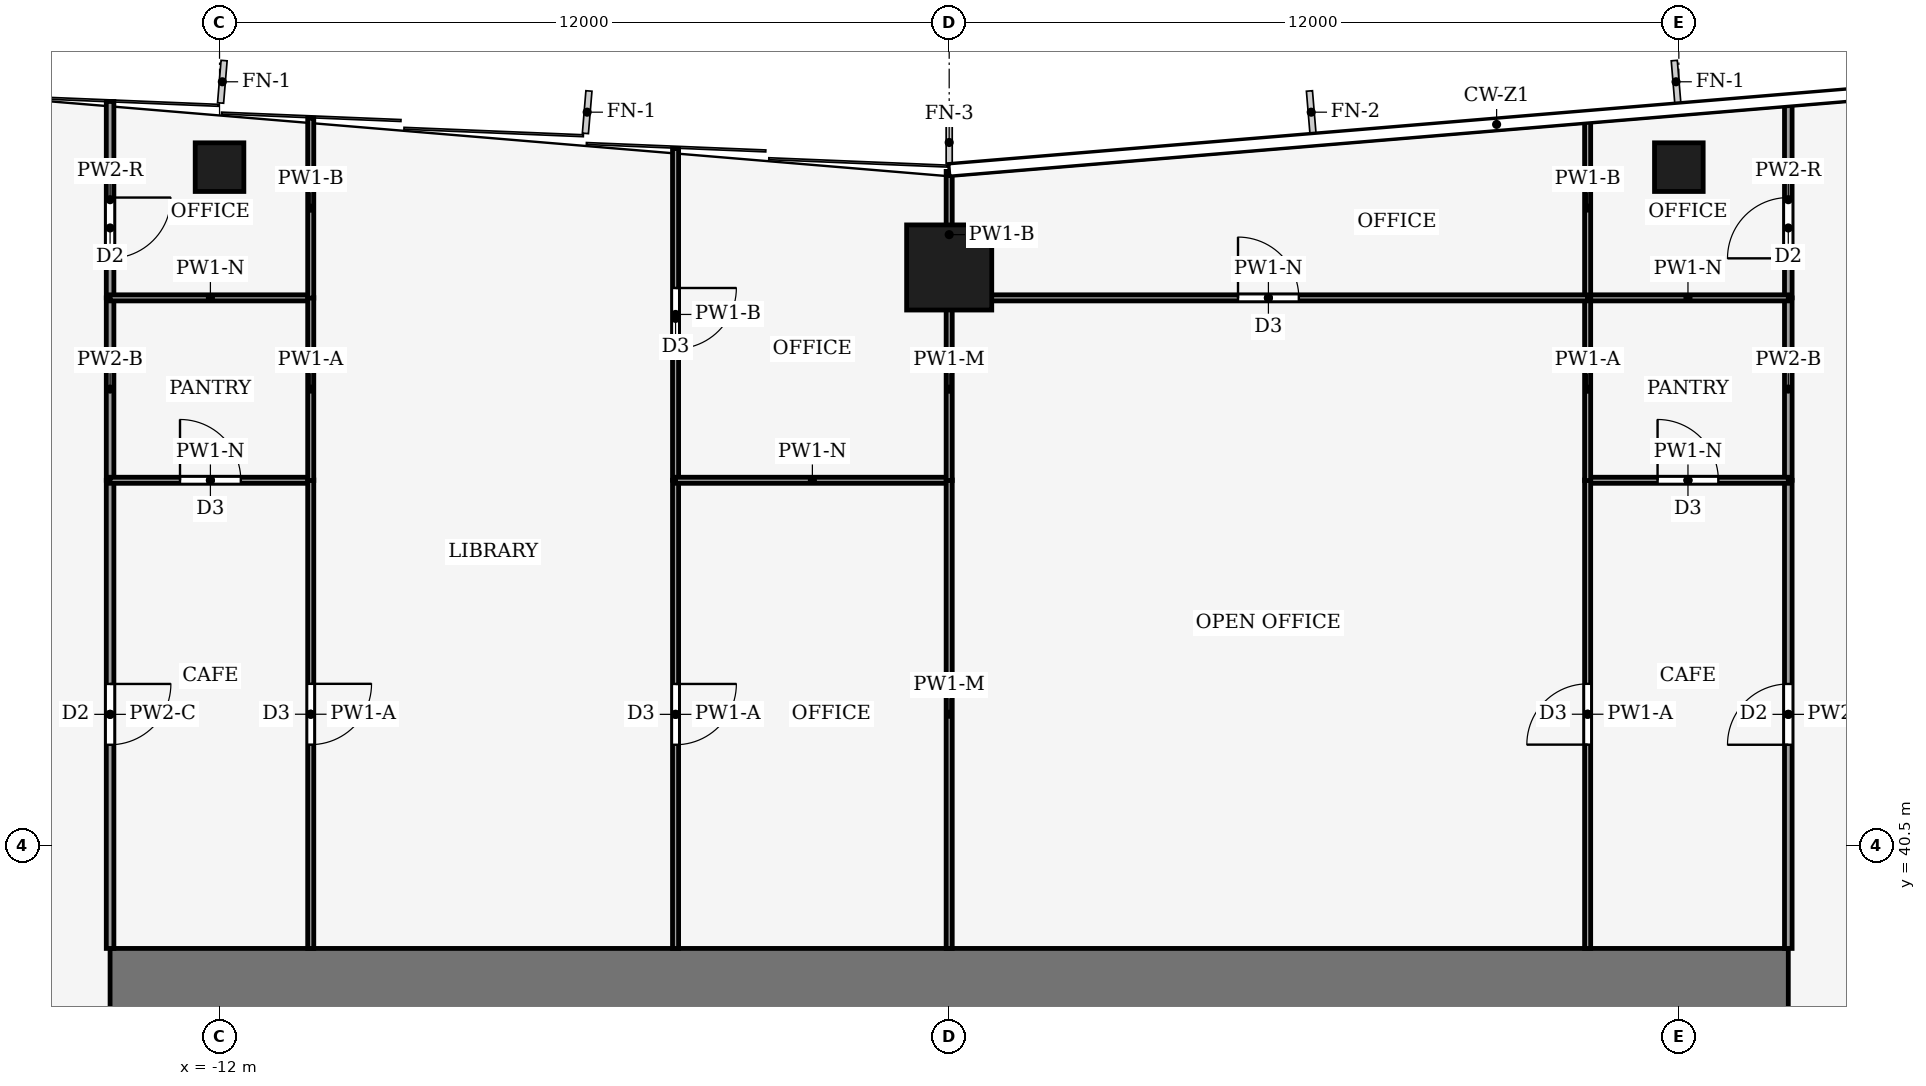
"""IFC4 building model, lengths in metres.
Left out: names, types, materials, properties, quantities, classifications, styles, units other than length and angle.
Written with IfcOpenShell. Run it as: python <this file> out.ifc"""

import sys

from ifc_helpers import new_model, si_unit, direction, frame, frame_2d, origin, origin_2d, place, context, subcontext, project, spatial, rectangle, hollow_rectangle, extrude, element, fill, save


model = new_model("IFC4")
c1 = context("Model", 3, precision=1e-05, world=origin(), true_north=direction((0.0, 1.0)))
c2 = subcontext(c1, "Body", "Model", "MODEL_VIEW")
j1 = project(units=[si_unit("LENGTHUNIT", "METRE"), si_unit("PLANEANGLEUNIT", "RADIAN")], contexts=[c1])
p1 = place(None, origin())
s1 = spatial("IfcSite", under=j1, at=p1, CompositionType="ELEMENT")
p2 = place(p1, origin())
s2 = spatial("IfcBuilding", under=s1, at=p2, CompositionType="ELEMENT")
p3 = place(p2, frame((0.0, 0.0, 65.0)))
s3 = spatial("IfcBuildingStorey", under=s2, at=p3, CompositionType="ELEMENT", Elevation=65.0)
p4 = place(p3, frame((-13.8, 38.2, -0.13), z_axis=(0.0, 0.0, 1.0), x_axis=(1.0, 0.0, 0.0)))
e1 = element("IfcWall", 1, at=p4, inside=s3, PredefinedType="SHEAR", context=c2, shape_type="SweptSolid", body=[
    extrude(rectangle(XDim=27.6, YDim=1.2, at=frame_2d((13.8, 0.0))), origin(), (0.0, 0.0, 1.0), 5.0),
])
p5 = place(p3, frame((0.0, 50.0, 0.0), z_axis=(0.0, 0.0, 1.0), x_axis=(1.0, 0.0, 0.0)))
e2 = element("IfcColumn", 2, at=p5, inside=s3, PredefinedType="COLUMN", context=c2, shape_type="SweptSolid", body=[
    extrude(hollow_rectangle(XDim=1.4, YDim=1.4, WallThickness=0.08, at=origin_2d()), origin(), (0.0, 0.0, 1.0), 5.0),
])
for number, where, z_axis, x_axis in (
    (3, (-12.0, 51.65, 0.0), (0.0, 0.0, 1.0), (1.0, 0.0, 0.0)),
    (4, (12.0, 51.65, 0.0), (0.0, 0.0, 1.0), (1.0, 0.0, 0.0)),
):
    element("IfcColumn", number, at=place(p3, frame(where, z_axis=z_axis, x_axis=x_axis)), inside=s3, PredefinedType="COLUMN", context=c2, shape_type="SweptSolid", body=[
        extrude(hollow_rectangle(XDim=0.8, YDim=0.8, WallThickness=0.04, at=origin_2d()), origin(), (0.0, 0.0, 1.0), 5.0),
    ])
p6 = place(p3, frame((-13.8, 46.5, 0.0), z_axis=(0.0, 0.0, 1.0), x_axis=(0.0, -1.0, 0.0)))
e5 = element("IfcWall", 5, at=p6, inside=s3, PredefinedType="PARTITIONING", context=c2, shape_type="SweptSolid", body=[
    extrude(rectangle(XDim=7.7, YDim=0.125, at=frame_2d((3.85, 0.0))), origin(), (0.0, 0.0, 1.0), 4.14),
])
p7 = place(p6, frame((3.35, 0.0, 0.0)))
e6 = element("IfcOpeningElement", 6, at=p7, cuts=e5, PredefinedType="OPENING", context=c2, shape_type="SweptSolid", body=[
    extrude(rectangle(XDim=1.0, YDim=2.1, at=frame_2d((0.5, 1.05))), frame((0.0, 0.073, 0.0), z_axis=(0.0, -1.0, 0.0), x_axis=(1.0, 0.0, 0.0)), (0.0, 0.0, 1.0), 0.145),
])
p8 = place(p3, frame((-13.8, 46.5, 0.0), z_axis=(0.0, 0.0, 1.0), x_axis=(0.0, 1.0, 0.0)))
e7 = element("IfcWall", 7, at=p8, inside=s3, PredefinedType="PARTITIONING", context=c2, shape_type="SweptSolid", body=[
    extrude(rectangle(XDim=3.0, YDim=0.125, at=frame_2d((1.5, 0.0))), origin(), (0.0, 0.0, 1.0), 4.87),
])
p9 = place(p3, frame((-13.8, 52.73, 0.0), z_axis=(0.0, 0.0, 1.0), x_axis=(0.0, -1.0, 0.0)))
e8 = element("IfcWall", 8, at=p9, inside=s3, PredefinedType="PARTITIONING", context=c2, shape_type="SweptSolid", body=[
    extrude(rectangle(XDim=3.23, YDim=0.125, at=frame_2d((1.615, 0.0))), origin(), (0.0, 0.0, 1.0), 4.04),
])
p10 = place(p9, frame((1.58, 0.0, 0.0)))
e9 = element("IfcOpeningElement", 9, at=p10, cuts=e8, PredefinedType="OPENING", context=c2, shape_type="SweptSolid", body=[
    extrude(rectangle(XDim=1.0, YDim=2.1, at=frame_2d((0.5, 1.05))), frame((0.0, 0.073, 0.0), z_axis=(0.0, -1.0, 0.0), x_axis=(1.0, 0.0, 0.0)), (0.0, 0.0, 1.0), 0.145),
])
p11 = place(p3, frame((13.8, 38.8, 0.0), z_axis=(0.0, 0.0, 1.0), x_axis=(0.0, 1.0, 0.0)))
e10 = element("IfcWall", 10, at=p11, inside=s3, PredefinedType="PARTITIONING", context=c2, shape_type="SweptSolid", body=[
    extrude(rectangle(XDim=7.7, YDim=0.125, at=frame_2d((3.85, 0.0))), origin(), (0.0, 0.0, 1.0), 4.14),
])
p12 = place(p11, frame((3.35, 0.0, 0.0)))
e11 = element("IfcOpeningElement", 11, at=p12, cuts=e10, PredefinedType="OPENING", context=c2, shape_type="SweptSolid", body=[
    extrude(rectangle(XDim=1.0, YDim=2.1, at=frame_2d((0.5, 1.05))), frame((0.0, 0.073, 0.0), z_axis=(0.0, -1.0, 0.0), x_axis=(1.0, 0.0, 0.0)), (0.0, 0.0, 1.0), 0.145),
])
p13 = place(p3, frame((13.8, 49.5, 0.0), z_axis=(0.0, 0.0, 1.0), x_axis=(0.0, -1.0, 0.0)))
e12 = element("IfcWall", 12, at=p13, inside=s3, PredefinedType="PARTITIONING", context=c2, shape_type="SweptSolid", body=[
    extrude(rectangle(XDim=3.0, YDim=0.125, at=frame_2d((1.5, 0.0))), origin(), (0.0, 0.0, 1.0), 4.87),
])
p14 = place(p3, frame((13.8, 49.5, 0.0), z_axis=(0.0, 0.0, 1.0), x_axis=(0.0, 1.0, 0.0)))
e13 = element("IfcWall", 13, at=p14, inside=s3, PredefinedType="PARTITIONING", context=c2, shape_type="SweptSolid", body=[
    extrude(rectangle(XDim=3.23, YDim=0.125, at=frame_2d((1.615, 0.0))), origin(), (0.0, 0.0, 1.0), 4.04),
])
p15 = place(p14, frame((0.65, 0.0, 0.0)))
e14 = element("IfcOpeningElement", 14, at=p15, cuts=e13, PredefinedType="OPENING", context=c2, shape_type="SweptSolid", body=[
    extrude(rectangle(XDim=1.0, YDim=2.1, at=frame_2d((0.5, 1.05))), frame((0.0, 0.073, 0.0), z_axis=(0.0, -1.0, 0.0), x_axis=(1.0, 0.0, 0.0)), (0.0, 0.0, 1.0), 0.145),
])
p16 = place(p3, frame((-13.8, 46.5, 0.0), z_axis=(0.0, 0.0, 1.0), x_axis=(1.0, 0.0, 0.0)))
e15 = element("IfcWall", 15, at=p16, inside=s3, PredefinedType="PARTITIONING", context=c2, shape_type="SweptSolid", body=[
    extrude(rectangle(XDim=3.3, YDim=0.1, at=frame_2d((1.65, 0.0))), origin(), (0.0, 0.0, 1.0), 4.39),
])
p17 = place(p16, frame((1.15, 0.0, 0.0)))
e16 = element("IfcOpeningElement", 16, at=p17, cuts=e15, PredefinedType="OPENING", context=c2, shape_type="SweptSolid", body=[
    extrude(rectangle(XDim=1.0, YDim=2.1, at=frame_2d((0.5, 1.05))), frame((0.0, 0.06, 0.0), z_axis=(0.0, -1.0, 0.0), x_axis=(1.0, 0.0, 0.0)), (0.0, 0.0, 1.0), 0.12),
])
p18 = place(p3, frame((-10.5, 46.504, 0.0), z_axis=(0.0, 0.0, 1.0), x_axis=(0.0, -1.0, 0.0)))
e17 = element("IfcWall", 17, at=p18, inside=s3, PredefinedType="PARTITIONING", context=c2, shape_type="SweptSolid", body=[
    extrude(rectangle(XDim=7.704, YDim=0.1, at=frame_2d((3.852, 0.0))), origin(), (0.0, 0.0, 1.0), 4.87),
])
p19 = place(p18, frame((3.352, 0.0, 0.0)))
e18 = element("IfcOpeningElement", 18, at=p19, cuts=e17, PredefinedType="OPENING", context=c2, shape_type="SweptSolid", body=[
    extrude(rectangle(XDim=1.0, YDim=2.1, at=frame_2d((0.5, 1.05))), frame((0.0, 0.06, 0.0), z_axis=(0.0, -1.0, 0.0), x_axis=(1.0, 0.0, 0.0)), (0.0, 0.0, 1.0), 0.12),
])
p20 = place(p3, frame((-10.5, 49.5, 0.0), z_axis=(0.0, 0.0, 1.0), x_axis=(-1.0, 0.0, 0.0)))
e19 = element("IfcWall", 19, at=p20, inside=s3, PredefinedType="PARTITIONING", context=c2, shape_type="SweptSolid", body=[
    extrude(rectangle(XDim=3.3, YDim=0.1, at=frame_2d((1.65, 0.0))), origin(), (0.0, 0.0, 1.0), 4.39),
])
p21 = place(p3, frame((-10.5, 46.496, 0.0), z_axis=(0.0, 0.0, 1.0), x_axis=(0.0, 1.0, 0.0)))
e20 = element("IfcWall", 20, at=p21, inside=s3, PredefinedType="PARTITIONING", context=c2, shape_type="SweptSolid", body=[
    extrude(rectangle(XDim=3.008, YDim=0.1, at=frame_2d((1.504, 0.0))), origin(), (0.0, 0.0, 1.0), 4.87),
])
p22 = place(p3, frame((-10.5, 49.496, 0.0), z_axis=(0.0, 0.0, 1.0), x_axis=(0.0, 1.0, 0.0)))
e21 = element("IfcWall", 21, at=p22, inside=s3, PredefinedType="PARTITIONING", context=c2, shape_type="SweptSolid", body=[
    extrude(rectangle(XDim=2.959, YDim=0.1, at=frame_2d((1.479, 0.0))), origin(), (0.0, 0.0, 1.0), 4.04),
])
p23 = place(p3, frame((-4.5, 46.5, 0.0), z_axis=(0.0, 0.0, 1.0), x_axis=(0.0, -1.0, 0.0)))
e22 = element("IfcWall", 22, at=p23, inside=s3, PredefinedType="PARTITIONING", context=c2, shape_type="SweptSolid", body=[
    extrude(rectangle(XDim=7.7, YDim=0.1, at=frame_2d((3.85, 0.0))), origin(), (0.0, 0.0, 1.0), 4.87),
])
p24 = place(p23, frame((3.35, 0.0, 0.0)))
e23 = element("IfcOpeningElement", 23, at=p24, cuts=e22, PredefinedType="OPENING", context=c2, shape_type="SweptSolid", body=[
    extrude(rectangle(XDim=1.0, YDim=2.1, at=frame_2d((0.5, 1.05))), frame((0.0, 0.06, 0.0), z_axis=(0.0, -1.0, 0.0), x_axis=(1.0, 0.0, 0.0)), (0.0, 0.0, 1.0), 0.12),
])
p25 = place(p3, frame((-4.5, 51.955, 0.0), z_axis=(0.0, 0.0, 1.0), x_axis=(0.0, -1.0, 0.0)))
e24 = element("IfcWall", 24, at=p25, inside=s3, PredefinedType="PARTITIONING", context=c2, shape_type="SweptSolid", body=[
    extrude(rectangle(XDim=5.455, YDim=0.1, at=frame_2d((2.728, 0.0))), origin(), (0.0, 0.0, 1.0), 4.04),
])
p26 = place(p25, frame((2.292, 0.0, 0.0)))
e25 = element("IfcOpeningElement", 25, at=p26, cuts=e24, PredefinedType="OPENING", context=c2, shape_type="SweptSolid", body=[
    extrude(rectangle(XDim=1.0, YDim=2.1, at=frame_2d((0.5, 1.05))), frame((0.0, 0.06, 0.0), z_axis=(0.0, -1.0, 0.0), x_axis=(1.0, 0.0, 0.0)), (0.0, 0.0, 1.0), 0.12),
])
p27 = place(p3, frame((0.0, 46.5, 0.0), z_axis=(0.0, 0.0, 1.0), x_axis=(-1.0, 0.0, 0.0)))
e26 = element("IfcWall", 26, at=p27, inside=s3, PredefinedType="PARTITIONING", context=c2, shape_type="SweptSolid", body=[
    extrude(rectangle(XDim=4.5, YDim=0.1, at=frame_2d((2.25, 0.0))), origin(), (0.0, 0.0, 1.0), 4.39),
])
p28 = place(p3, frame((0.0, 38.8, 0.0), z_axis=(0.0, 0.0, 1.0), x_axis=(0.0, 1.0, 0.0)))
e27 = element("IfcWall", 27, at=p28, inside=s3, PredefinedType="PARTITIONING", context=c2, shape_type="SweptSolid", body=[
    extrude(rectangle(XDim=7.704, YDim=0.1, at=frame_2d((3.852, 0.0))), origin(), (0.0, 0.0, 1.0), 4.44),
])
p29 = place(p3, frame((0.0, 46.496, 0.0), z_axis=(0.0, 0.0, 1.0), x_axis=(0.0, 1.0, 0.0)))
e28 = element("IfcWall", 28, at=p29, inside=s3, PredefinedType="PARTITIONING", context=c2, shape_type="SweptSolid", body=[
    extrude(rectangle(XDim=3.004, YDim=0.1, at=frame_2d((1.502, 0.0))), origin(), (0.0, 0.0, 1.0), 4.44),
])
p30 = place(p3, frame((0.0, 49.5, 0.0), z_axis=(0.0, 0.0, 1.0), x_axis=(0.0, 1.0, 0.0)))
e29 = element("IfcWall", 29, at=p30, inside=s3, PredefinedType="PARTITIONING", context=c2, shape_type="SweptSolid", body=[
    extrude(rectangle(XDim=2.08, YDim=0.1, at=frame_2d((1.04, 0.0))), origin(), (0.0, 0.0, 1.0), 4.04),
])
p31 = place(p3, frame((10.5, 46.5, 0.0), z_axis=(0.0, 0.0, 1.0), x_axis=(1.0, 0.0, 0.0)))
e30 = element("IfcWall", 30, at=p31, inside=s3, PredefinedType="PARTITIONING", context=c2, shape_type="SweptSolid", body=[
    extrude(rectangle(XDim=3.3, YDim=0.1, at=frame_2d((1.65, 0.0))), origin(), (0.0, 0.0, 1.0), 4.39),
])
p32 = place(p31, frame((1.15, 0.0, 0.0)))
e31 = element("IfcOpeningElement", 31, at=p32, cuts=e30, PredefinedType="OPENING", context=c2, shape_type="SweptSolid", body=[
    extrude(rectangle(XDim=1.0, YDim=2.1, at=frame_2d((0.5, 1.05))), frame((0.0, 0.06, 0.0), z_axis=(0.0, -1.0, 0.0), x_axis=(1.0, 0.0, 0.0)), (0.0, 0.0, 1.0), 0.12),
])
p33 = place(p3, frame((10.5, 38.8, 0.0), z_axis=(0.0, 0.0, 1.0), x_axis=(0.0, 1.0, 0.0)))
e32 = element("IfcWall", 32, at=p33, inside=s3, PredefinedType="PARTITIONING", context=c2, shape_type="SweptSolid", body=[
    extrude(rectangle(XDim=7.704, YDim=0.1, at=frame_2d((3.852, 0.0))), origin(), (0.0, 0.0, 1.0), 4.87),
])
p34 = place(p33, frame((3.352, 0.0, 0.0)))
e33 = element("IfcOpeningElement", 33, at=p34, cuts=e32, PredefinedType="OPENING", context=c2, shape_type="SweptSolid", body=[
    extrude(rectangle(XDim=1.0, YDim=2.1, at=frame_2d((0.5, 1.05))), frame((0.0, 0.06, 0.0), z_axis=(0.0, -1.0, 0.0), x_axis=(1.0, 0.0, 0.0)), (0.0, 0.0, 1.0), 0.12),
])
p35 = place(p3, frame((13.8, 49.5, 0.0), z_axis=(0.0, 0.0, 1.0), x_axis=(-1.0, 0.0, 0.0)))
e34 = element("IfcWall", 34, at=p35, inside=s3, PredefinedType="PARTITIONING", context=c2, shape_type="SweptSolid", body=[
    extrude(rectangle(XDim=3.3, YDim=0.1, at=frame_2d((1.65, 0.0))), origin(), (0.0, 0.0, 1.0), 4.39),
])
p36 = place(p3, frame((10.5, 49.5, 0.0), z_axis=(0.0, 0.0, 1.0), x_axis=(0.0, -1.0, 0.0)))
e35 = element("IfcWall", 35, at=p36, inside=s3, PredefinedType="PARTITIONING", context=c2, shape_type="SweptSolid", body=[
    extrude(rectangle(XDim=3.004, YDim=0.1, at=frame_2d((1.502, 0.0))), origin(), (0.0, 0.0, 1.0), 4.87),
])
p37 = place(p3, frame((10.5, 52.455, 0.0), z_axis=(0.0, 0.0, 1.0), x_axis=(0.0, -1.0, 0.0)))
e36 = element("IfcWall", 36, at=p37, inside=s3, PredefinedType="PARTITIONING", context=c2, shape_type="SweptSolid", body=[
    extrude(rectangle(XDim=2.955, YDim=0.1, at=frame_2d((1.478, 0.0))), origin(), (0.0, 0.0, 1.0), 4.04),
])
p38 = place(p3, frame((0.0, 49.5, 0.0), z_axis=(0.0, 0.0, 1.0), x_axis=(1.0, 0.0, 0.0)))
e37 = element("IfcWall", 37, at=p38, inside=s3, PredefinedType="PARTITIONING", context=c2, shape_type="SweptSolid", body=[
    extrude(rectangle(XDim=10.5, YDim=0.1, at=frame_2d((5.25, 0.0))), origin(), (0.0, 0.0, 1.0), 4.39),
])
p39 = place(p38, frame((4.75, 0.0, 0.0)))
e38 = element("IfcOpeningElement", 38, at=p39, cuts=e37, PredefinedType="OPENING", context=c2, shape_type="SweptSolid", body=[
    extrude(rectangle(XDim=1.0, YDim=2.1, at=frame_2d((0.5, 1.05))), frame((0.0, 0.06, 0.0), z_axis=(0.0, -1.0, 0.0), x_axis=(1.0, 0.0, 0.0)), (0.0, 0.0, 1.0), 0.12),
])
p40 = place(p7, origin())
e39 = element("IfcDoor", 39, at=p40, inside=s3, OperationType="SINGLE_SWING_RIGHT", PredefinedType="DOOR", context=c2, shape_type="SweptSolid", body=[
    extrude(rectangle(XDim=1.0, YDim=2.1, at=frame_2d((0.5, 1.05))), frame((0.0, 0.025, 0.0), z_axis=(0.0, -1.0, 0.0), x_axis=(1.0, 0.0, 0.0)), (0.0, 0.0, 1.0), 0.05),
])
fill(e6, e39)
p41 = place(p10, origin())
e40 = element("IfcDoor", 40, at=p41, inside=s3, OperationType="SINGLE_SWING_RIGHT", PredefinedType="DOOR", context=c2, shape_type="SweptSolid", body=[
    extrude(rectangle(XDim=1.0, YDim=2.1, at=frame_2d((0.5, 1.05))), frame((0.0, 0.025, 0.0), z_axis=(0.0, -1.0, 0.0), x_axis=(1.0, 0.0, 0.0)), (0.0, 0.0, 1.0), 0.05),
])
fill(e9, e40)
p42 = place(p12, origin())
e41 = element("IfcDoor", 41, at=p42, inside=s3, OperationType="SINGLE_SWING_LEFT", PredefinedType="DOOR", context=c2, shape_type="SweptSolid", body=[
    extrude(rectangle(XDim=1.0, YDim=2.1, at=frame_2d((0.5, 1.05))), frame((0.0, 0.025, 0.0), z_axis=(0.0, -1.0, 0.0), x_axis=(1.0, 0.0, 0.0)), (0.0, 0.0, 1.0), 0.05),
])
fill(e11, e41)
p43 = place(p15, origin())
e42 = element("IfcDoor", 42, at=p43, inside=s3, OperationType="SINGLE_SWING_LEFT", PredefinedType="DOOR", context=c2, shape_type="SweptSolid", body=[
    extrude(rectangle(XDim=1.0, YDim=2.1, at=frame_2d((0.5, 1.05))), frame((0.0, 0.025, 0.0), z_axis=(0.0, -1.0, 0.0), x_axis=(1.0, 0.0, 0.0)), (0.0, 0.0, 1.0), 0.05),
])
fill(e14, e42)
p44 = place(p17, origin())
e43 = element("IfcDoor", 43, at=p44, inside=s3, OperationType="SINGLE_SWING_RIGHT", PredefinedType="DOOR", context=c2, shape_type="SweptSolid", body=[
    extrude(rectangle(XDim=1.0, YDim=2.1, at=frame_2d((0.5, 1.05))), frame((0.0, 0.025, 0.0), z_axis=(0.0, -1.0, 0.0), x_axis=(1.0, 0.0, 0.0)), (0.0, 0.0, 1.0), 0.05),
])
fill(e16, e43)
p45 = place(p19, origin())
e44 = element("IfcDoor", 44, at=p45, inside=s3, OperationType="SINGLE_SWING_LEFT", PredefinedType="DOOR", context=c2, shape_type="SweptSolid", body=[
    extrude(rectangle(XDim=1.0, YDim=2.1, at=frame_2d((0.5, 1.05))), frame((0.0, 0.025, 0.0), z_axis=(0.0, -1.0, 0.0), x_axis=(1.0, 0.0, 0.0)), (0.0, 0.0, 1.0), 0.05),
])
fill(e18, e44)
p46 = place(p24, origin())
e45 = element("IfcDoor", 45, at=p46, inside=s3, OperationType="SINGLE_SWING_RIGHT", PredefinedType="DOOR", context=c2, shape_type="SweptSolid", body=[
    extrude(rectangle(XDim=1.0, YDim=2.1, at=frame_2d((0.5, 1.05))), frame((0.0, 0.025, 0.0), z_axis=(0.0, -1.0, 0.0), x_axis=(1.0, 0.0, 0.0)), (0.0, 0.0, 1.0), 0.05),
])
fill(e23, e45)
p47 = place(p26, origin())
e46 = element("IfcDoor", 46, at=p47, inside=s3, OperationType="SINGLE_SWING_RIGHT", PredefinedType="DOOR", context=c2, shape_type="SweptSolid", body=[
    extrude(rectangle(XDim=1.0, YDim=2.1, at=frame_2d((0.5, 1.05))), frame((0.0, 0.025, 0.0), z_axis=(0.0, -1.0, 0.0), x_axis=(1.0, 0.0, 0.0)), (0.0, 0.0, 1.0), 0.05),
])
fill(e25, e46)
p48 = place(p32, origin())
e47 = element("IfcDoor", 47, at=p48, inside=s3, OperationType="SINGLE_SWING_RIGHT", PredefinedType="DOOR", context=c2, shape_type="SweptSolid", body=[
    extrude(rectangle(XDim=1.0, YDim=2.1, at=frame_2d((0.5, 1.05))), frame((0.0, 0.025, 0.0), z_axis=(0.0, -1.0, 0.0), x_axis=(1.0, 0.0, 0.0)), (0.0, 0.0, 1.0), 0.05),
])
fill(e31, e47)
p49 = place(p34, origin())
e48 = element("IfcDoor", 48, at=p49, inside=s3, OperationType="SINGLE_SWING_LEFT", PredefinedType="DOOR", context=c2, shape_type="SweptSolid", body=[
    extrude(rectangle(XDim=1.0, YDim=2.1, at=frame_2d((0.5, 1.05))), frame((0.0, 0.025, 0.0), z_axis=(0.0, -1.0, 0.0), x_axis=(1.0, 0.0, 0.0)), (0.0, 0.0, 1.0), 0.05),
])
fill(e33, e48)
p50 = place(p39, origin())
e49 = element("IfcDoor", 49, at=p50, inside=s3, OperationType="SINGLE_SWING_RIGHT", PredefinedType="DOOR", context=c2, shape_type="SweptSolid", body=[
    extrude(rectangle(XDim=1.0, YDim=2.1, at=frame_2d((0.5, 1.05))), frame((0.0, 0.025, 0.0), z_axis=(0.0, -1.0, 0.0), x_axis=(1.0, 0.0, 0.0)), (0.0, 0.0, 1.0), 0.05),
])
fill(e38, e49)
save(model, sys.argv[1])
